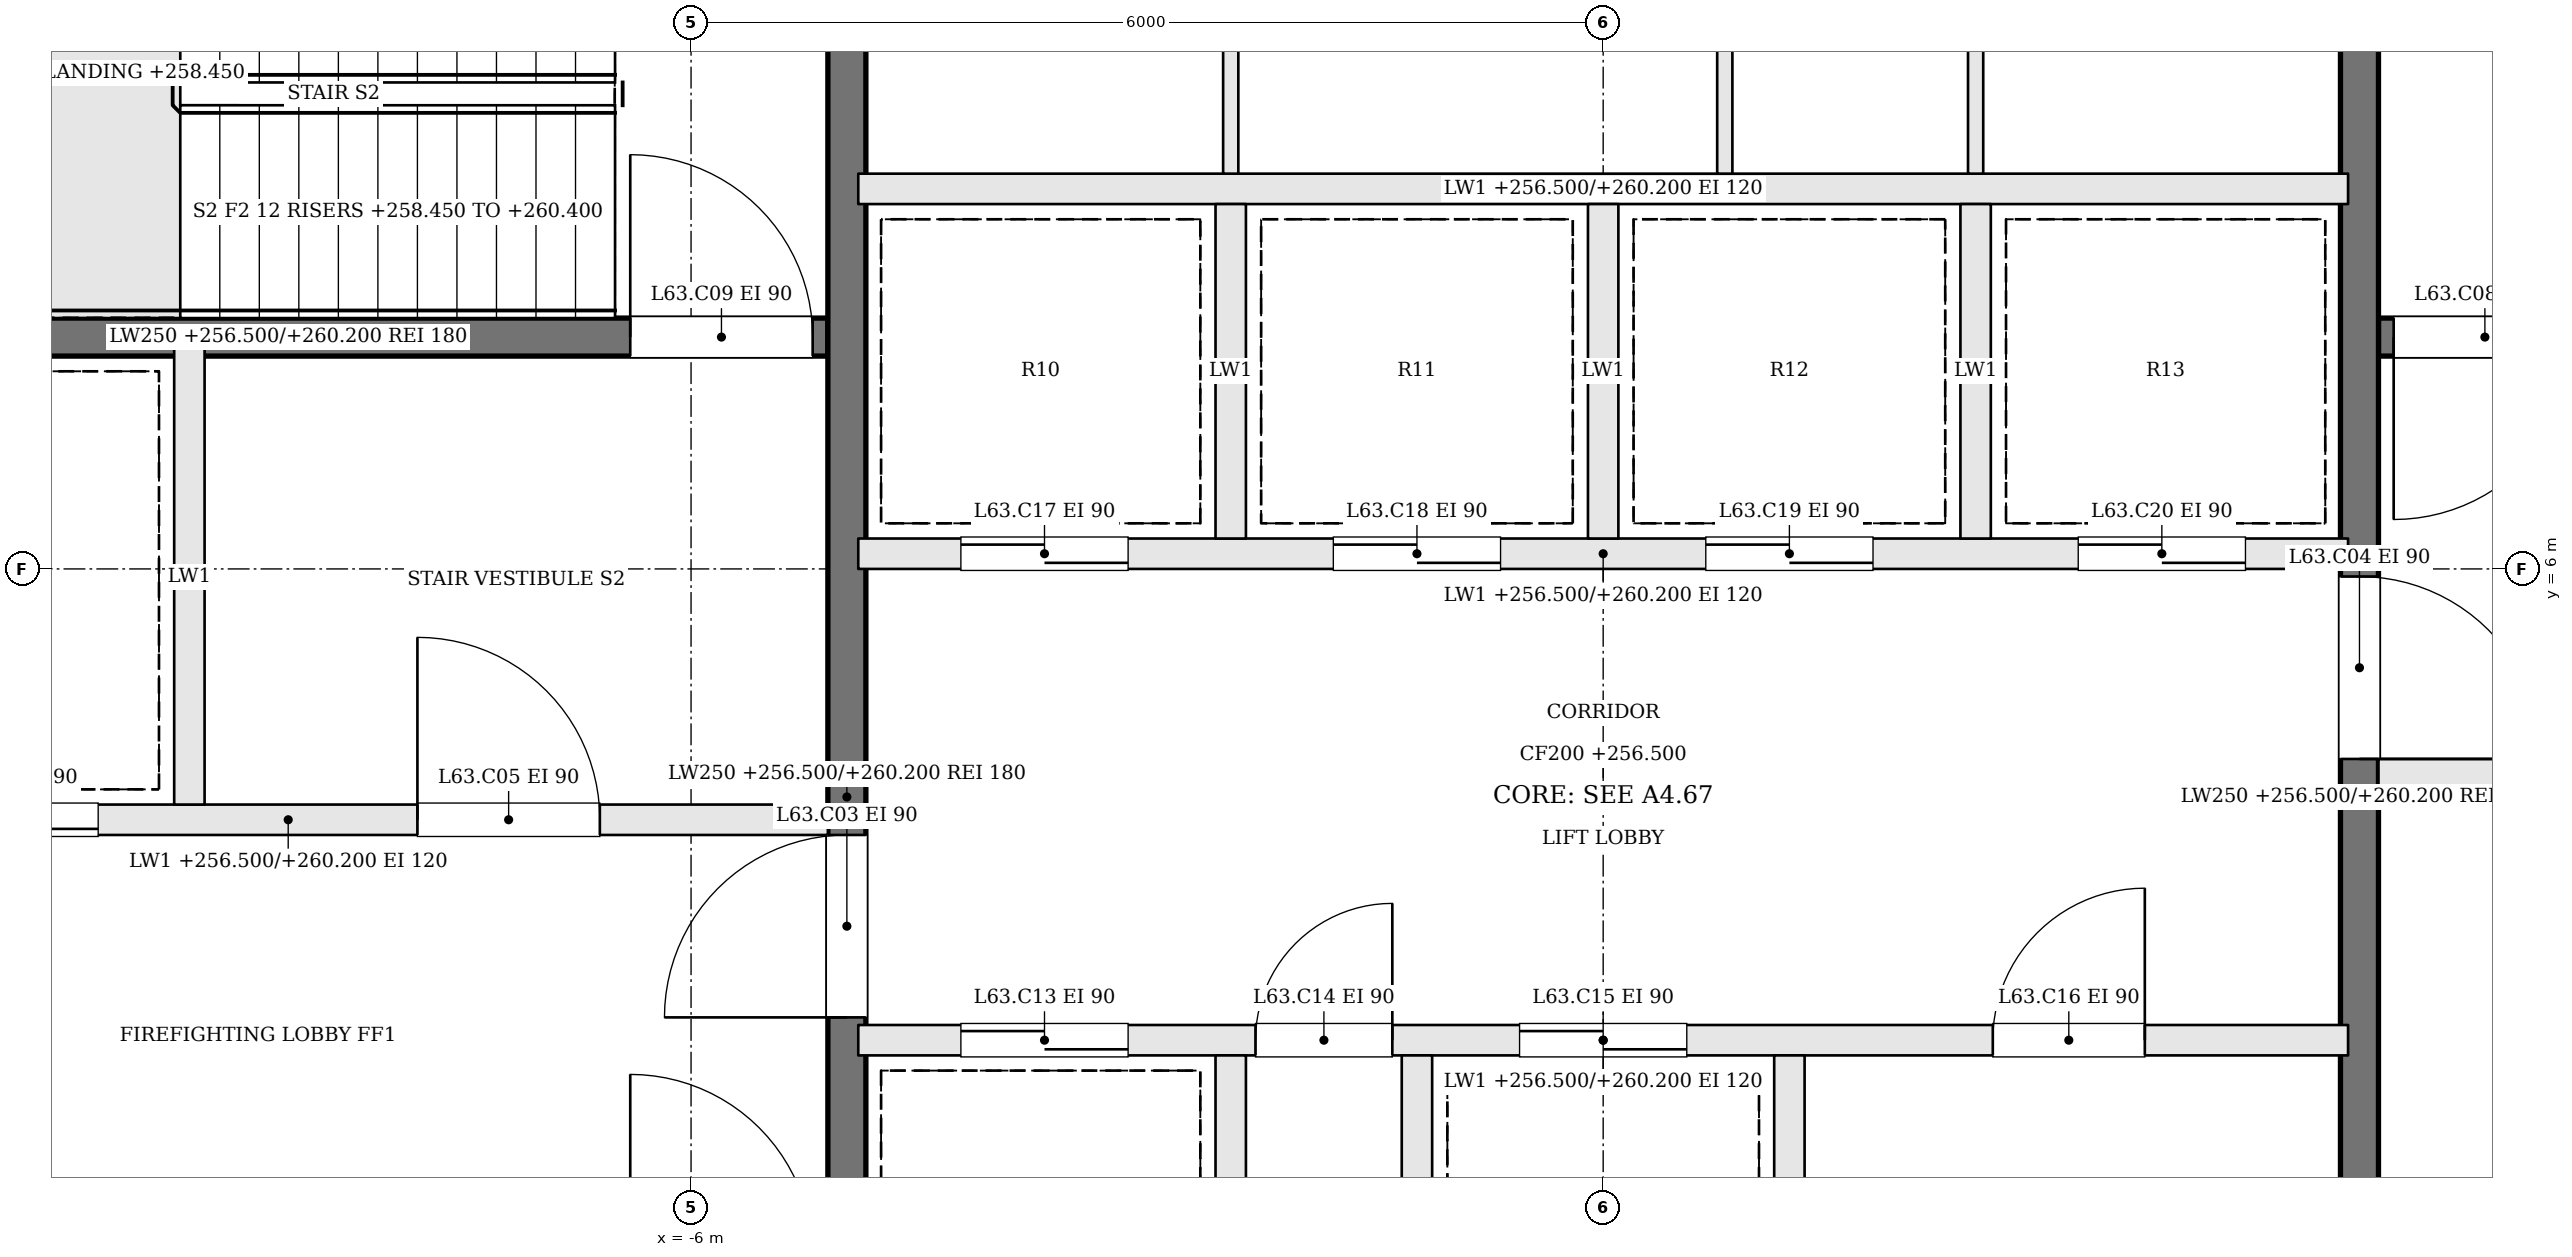
"""IFC4 building model, lengths in metres.
Left out: names, types, materials, properties, quantities, classifications, styles, units other than length and angle.
Written with IfcOpenShell. Run it as: python <this file> out.ifc"""

import sys

from ifc_helpers import new_model, si_unit, direction, frame, frame_2d, origin, place, context, subcontext, project, spatial, rectangle, extrude, element, fill, save


model = new_model("IFC4")
c1 = context("Model", 3, precision=1e-05, world=origin(), true_north=direction((0.0, 1.0)))
c2 = subcontext(c1, "Body", "Model", "MODEL_VIEW")
j1 = project(units=[si_unit("LENGTHUNIT", "METRE"), si_unit("PLANEANGLEUNIT", "RADIAN")], contexts=[c1])
p1 = place(None, origin())
s1 = spatial("IfcSite", under=j1, at=p1, CompositionType="ELEMENT")
p2 = place(p1, origin())
s2 = spatial("IfcBuilding", under=s1, at=p2, CompositionType="ELEMENT")
p3 = place(p2, frame((0.0, 0.0, 256.5)))
s3 = spatial("IfcBuildingStorey", under=s2, at=p3, CompositionType="ELEMENT", Elevation=256.5)
p4 = place(p3, frame((12.2, 7.525, 0.0), z_axis=(0.0, 0.0, 1.0), x_axis=(-1.0, 0.0, 0.0)))
e1 = element("IfcWall", 1, at=p4, inside=s3, PredefinedType="SOLIDWALL", context=c2, shape_type="SweptSolid", body=[
    extrude(rectangle(XDim=7.1, YDim=0.25, at=frame_2d((3.55, 0.0))), origin(), (0.0, 0.0, 1.0), 3.7),
])
p5 = place(p4, frame((5.8, 0.0, 0.0)))
e2 = element("IfcOpeningElement", 2, at=p5, cuts=e1, PredefinedType="OPENING", context=c2, shape_type="SweptSolid", body=[
    extrude(rectangle(XDim=1.2, YDim=2.1, at=frame_2d((0.6, 1.05))), frame((0.0, 0.135, 0.0), z_axis=(0.0, -1.0, 0.0), x_axis=(1.0, 0.0, 0.0)), (0.0, 0.0, 1.0), 0.27),
])
p6 = place(p3, frame((-12.2, 4.35, 0.0), z_axis=(0.0, 0.0, 1.0), x_axis=(1.0, 0.0, 0.0)))
e3 = element("IfcWall", 3, at=p6, inside=s3, PredefinedType="SOLIDWALL", context=c2, shape_type="SweptSolid", body=[
    extrude(rectangle(XDim=7.1, YDim=0.2, at=frame_2d((3.55, 0.0))), origin(), (0.0, 0.0, 1.0), 3.7),
])
p7 = place(p6, frame((4.4, 0.0, 0.0)))
e4 = element("IfcOpeningElement", 4, at=p7, cuts=e3, PredefinedType="OPENING", context=c2, shape_type="SweptSolid", body=[
    extrude(rectangle(XDim=1.2, YDim=2.1, at=frame_2d((0.6, 1.05))), frame((0.0, 0.11, 0.0), z_axis=(0.0, -1.0, 0.0), x_axis=(1.0, 0.0, 0.0)), (0.0, 0.0, 1.0), 0.22),
])
p8 = place(p6, frame((1.1, 0.0, 0.0)))
e5 = element("IfcOpeningElement", 5, at=p8, cuts=e3, PredefinedType="OPENING", context=c2, shape_type="SweptSolid", body=[
    extrude(rectangle(XDim=1.2, YDim=2.1, at=frame_2d((0.6, 1.05))), frame((0.0, 0.11, 0.0), z_axis=(0.0, -1.0, 0.0), x_axis=(1.0, 0.0, 0.0)), (0.0, 0.0, 1.0), 0.22),
])
p9 = place(p3, frame((12.2, 4.65, 0.0), z_axis=(0.0, 0.0, 1.0), x_axis=(-1.0, 0.0, 0.0)))
e6 = element("IfcWall", 6, at=p9, inside=s3, PredefinedType="SOLIDWALL", context=c2, shape_type="SweptSolid", body=[
    extrude(rectangle(XDim=7.1, YDim=0.2, at=frame_2d((3.55, 0.0))), origin(), (0.0, 0.0, 1.0), 3.7),
])
p10 = place(p9, frame((4.4, 0.0, 0.0)))
e7 = element("IfcOpeningElement", 7, at=p10, cuts=e6, PredefinedType="OPENING", context=c2, shape_type="SweptSolid", body=[
    extrude(rectangle(XDim=1.2, YDim=2.1, at=frame_2d((0.6, 1.05))), frame((0.0, 0.11, 0.0), z_axis=(0.0, -1.0, 0.0), x_axis=(1.0, 0.0, 0.0)), (0.0, 0.0, 1.0), 0.22),
])
p11 = place(p9, frame((1.1, 0.0, 0.0)))
e8 = element("IfcOpeningElement", 8, at=p11, cuts=e6, PredefinedType="OPENING", context=c2, shape_type="SweptSolid", body=[
    extrude(rectangle(XDim=1.2, YDim=2.1, at=frame_2d((0.6, 1.05))), frame((0.0, 0.11, 0.0), z_axis=(0.0, -1.0, 0.0), x_axis=(1.0, 0.0, 0.0)), (0.0, 0.0, 1.0), 0.22),
])
p12 = place(p3, frame((-12.2, 7.525, 0.0), z_axis=(0.0, 0.0, 1.0), x_axis=(1.0, 0.0, 0.0)))
e9 = element("IfcWall", 9, at=p12, inside=s3, PredefinedType="SOLIDWALL", context=c2, shape_type="SweptSolid", body=[
    extrude(rectangle(XDim=7.1, YDim=0.25, at=frame_2d((3.55, 0.0))), origin(), (0.0, 0.0, 1.0), 3.7),
])
p13 = place(p12, frame((5.8, 0.0, 0.0)))
e10 = element("IfcOpeningElement", 10, at=p13, cuts=e9, PredefinedType="OPENING", context=c2, shape_type="SweptSolid", body=[
    extrude(rectangle(XDim=1.2, YDim=2.1, at=frame_2d((0.6, 1.05))), frame((0.0, 0.135, 0.0), z_axis=(0.0, -1.0, 0.0), x_axis=(1.0, 0.0, 0.0)), (0.0, 0.0, 1.0), 0.27),
])
p14 = place(p3, frame((-9.3, 4.45, 0.0), z_axis=(0.0, 0.0, 1.0), x_axis=(0.0, 1.0, 0.0)))
e11 = element("IfcWall", 11, at=p14, inside=s3, PredefinedType="SOLIDWALL", context=c2, shape_type="SweptSolid", body=[
    extrude(rectangle(XDim=3.0, YDim=0.2, at=frame_2d((1.5, 0.0))), origin(), (0.0, 0.0, 1.0), 3.7),
])
p15 = place(p3, frame((-4.975, -2.2, 0.0), z_axis=(0.0, 0.0, 1.0), x_axis=(0.0, 1.0, 0.0)))
e12 = element("IfcWall", 12, at=p15, inside=s3, PredefinedType="SOLIDWALL", context=c2, shape_type="SweptSolid", body=[
    extrude(rectangle(XDim=13.4, YDim=0.25, at=frame_2d((6.7, 0.0))), origin(), (0.0, 0.0, 1.0), 3.7),
])
p16 = place(p15, frame((5.25, 0.0, 0.0)))
e13 = element("IfcOpeningElement", 13, at=p16, cuts=e12, PredefinedType="OPENING", context=c2, shape_type="SweptSolid", body=[
    extrude(rectangle(XDim=1.2, YDim=2.1, at=frame_2d((0.6, 1.05))), frame((0.0, 0.135, 0.0), z_axis=(0.0, -1.0, 0.0), x_axis=(1.0, 0.0, 0.0)), (0.0, 0.0, 1.0), 0.27),
])
p17 = place(p3, frame((4.975, 11.2, 0.0), z_axis=(0.0, 0.0, 1.0), x_axis=(0.0, -1.0, 0.0)))
e14 = element("IfcWall", 14, at=p17, inside=s3, PredefinedType="SOLIDWALL", context=c2, shape_type="SweptSolid", body=[
    extrude(rectangle(XDim=13.4, YDim=0.25, at=frame_2d((6.7, 0.0))), origin(), (0.0, 0.0, 1.0), 3.7),
])
p18 = place(p17, frame((5.25, 0.0, 0.0)))
e15 = element("IfcOpeningElement", 15, at=p18, cuts=e14, PredefinedType="OPENING", context=c2, shape_type="SweptSolid", body=[
    extrude(rectangle(XDim=1.2, YDim=2.1, at=frame_2d((0.6, 1.05))), frame((0.0, 0.135, 0.0), z_axis=(0.0, -1.0, 0.0), x_axis=(1.0, 0.0, 0.0)), (0.0, 0.0, 1.0), 0.27),
])
p19 = place(p3, frame((-4.9, 2.9, 0.0), z_axis=(0.0, 0.0, 1.0), x_axis=(1.0, 0.0, 0.0)))
e16 = element("IfcWall", 16, at=p19, inside=s3, PredefinedType="SOLIDWALL", context=c2, shape_type="SweptSolid", body=[
    extrude(rectangle(XDim=9.8, YDim=0.2, at=frame_2d((4.9, 0.0))), origin(), (0.0, 0.0, 1.0), 3.7),
])
p20 = place(p19, frame((0.675, 0.0, 0.0)))
e17 = element("IfcOpeningElement", 17, at=p20, cuts=e16, PredefinedType="OPENING", context=c2, shape_type="SweptSolid", body=[
    extrude(rectangle(XDim=1.1, YDim=2.1, at=frame_2d((0.55, 1.05))), frame((0.0, 0.11, 0.0), z_axis=(0.0, -1.0, 0.0), x_axis=(1.0, 0.0, 0.0)), (0.0, 0.0, 1.0), 0.22),
])
p21 = place(p19, frame((2.613, 0.0, 0.0)))
e18 = element("IfcOpeningElement", 18, at=p21, cuts=e16, PredefinedType="OPENING", context=c2, shape_type="SweptSolid", body=[
    extrude(rectangle(XDim=0.9, YDim=2.1, at=frame_2d((0.45, 1.05))), frame((0.0, 0.11, 0.0), z_axis=(0.0, -1.0, 0.0), x_axis=(1.0, 0.0, 0.0)), (0.0, 0.0, 1.0), 0.22),
])
p22 = place(p19, frame((4.35, 0.0, 0.0)))
e19 = element("IfcOpeningElement", 19, at=p22, cuts=e16, PredefinedType="OPENING", context=c2, shape_type="SweptSolid", body=[
    extrude(rectangle(XDim=1.1, YDim=2.1, at=frame_2d((0.55, 1.05))), frame((0.0, 0.11, 0.0), z_axis=(0.0, -1.0, 0.0), x_axis=(1.0, 0.0, 0.0)), (0.0, 0.0, 1.0), 0.22),
])
p23 = place(p19, frame((7.463, 0.0, 0.0)))
e20 = element("IfcOpeningElement", 20, at=p23, cuts=e16, PredefinedType="OPENING", context=c2, shape_type="SweptSolid", body=[
    extrude(rectangle(XDim=1.0, YDim=2.1, at=frame_2d((0.5, 1.05))), frame((0.0, 0.11, 0.0), z_axis=(0.0, -1.0, 0.0), x_axis=(1.0, 0.0, 0.0)), (0.0, 0.0, 1.0), 0.22),
])
p24 = place(p3, frame((-4.9, 6.1, 0.0), z_axis=(0.0, 0.0, 1.0), x_axis=(1.0, 0.0, 0.0)))
e21 = element("IfcWall", 21, at=p24, inside=s3, PredefinedType="SOLIDWALL", context=c2, shape_type="SweptSolid", body=[
    extrude(rectangle(XDim=9.8, YDim=0.2, at=frame_2d((4.9, 0.0))), origin(), (0.0, 0.0, 1.0), 3.7),
])
p25 = place(p24, frame((0.675, 0.0, 0.0)))
e22 = element("IfcOpeningElement", 22, at=p25, cuts=e21, PredefinedType="OPENING", context=c2, shape_type="SweptSolid", body=[
    extrude(rectangle(XDim=1.1, YDim=2.1, at=frame_2d((0.55, 1.05))), frame((0.0, 0.11, 0.0), z_axis=(0.0, -1.0, 0.0), x_axis=(1.0, 0.0, 0.0)), (0.0, 0.0, 1.0), 0.22),
])
p26 = place(p24, frame((3.125, 0.0, 0.0)))
e23 = element("IfcOpeningElement", 23, at=p26, cuts=e21, PredefinedType="OPENING", context=c2, shape_type="SweptSolid", body=[
    extrude(rectangle(XDim=1.1, YDim=2.1, at=frame_2d((0.55, 1.05))), frame((0.0, 0.11, 0.0), z_axis=(0.0, -1.0, 0.0), x_axis=(1.0, 0.0, 0.0)), (0.0, 0.0, 1.0), 0.22),
])
p27 = place(p24, frame((5.575, 0.0, 0.0)))
e24 = element("IfcOpeningElement", 24, at=p27, cuts=e21, PredefinedType="OPENING", context=c2, shape_type="SweptSolid", body=[
    extrude(rectangle(XDim=1.1, YDim=2.1, at=frame_2d((0.55, 1.05))), frame((0.0, 0.11, 0.0), z_axis=(0.0, -1.0, 0.0), x_axis=(1.0, 0.0, 0.0)), (0.0, 0.0, 1.0), 0.22),
])
p28 = place(p24, frame((8.025, 0.0, 0.0)))
e25 = element("IfcOpeningElement", 25, at=p28, cuts=e21, PredefinedType="OPENING", context=c2, shape_type="SweptSolid", body=[
    extrude(rectangle(XDim=1.1, YDim=2.1, at=frame_2d((0.55, 1.05))), frame((0.0, 0.11, 0.0), z_axis=(0.0, -1.0, 0.0), x_axis=(1.0, 0.0, 0.0)), (0.0, 0.0, 1.0), 0.22),
])
p29 = place(p3, frame((-4.9, 8.5, 0.0), z_axis=(0.0, 0.0, 1.0), x_axis=(1.0, 0.0, 0.0)))
e26 = element("IfcWall", 26, at=p29, inside=s3, PredefinedType="SOLIDWALL", context=c2, shape_type="SweptSolid", body=[
    extrude(rectangle(XDim=9.8, YDim=0.2, at=frame_2d((4.9, 0.0))), origin(), (0.0, 0.0, 1.0), 3.7),
])
for number, where, z_axis, x_axis in (
    (27, (-2.45, 0.6, 0.0), (0.0, 0.0, 1.0), (0.0, 1.0, 0.0)),
    (28, (-1.225, 0.6, 0.0), (0.0, 0.0, 1.0), (0.0, 1.0, 0.0)),
    (29, (1.225, 0.6, 0.0), (0.0, 0.0, 1.0), (0.0, 1.0, 0.0)),
    (30, (-2.45, 6.2, 0.0), (0.0, 0.0, 1.0), (0.0, 1.0, 0.0)),
    (31, (0.0, 6.2, 0.0), (0.0, 0.0, 1.0), (0.0, 1.0, 0.0)),
    (32, (2.45, 6.2, 0.0), (0.0, 0.0, 1.0), (0.0, 1.0, 0.0)),
):
    element("IfcWall", number, at=place(p3, frame(where, z_axis=z_axis, x_axis=x_axis)), inside=s3, PredefinedType="SOLIDWALL", context=c2, shape_type="SweptSolid", body=[
        extrude(rectangle(XDim=2.2, YDim=0.2, at=frame_2d((1.1, 0.0))), origin(), (0.0, 0.0, 1.0), 3.7),
    ])
for number, where, z_axis, x_axis in (
    (33, (-2.45, 8.6, 0.0), (0.0, 0.0, 1.0), (0.0, 1.0, 0.0)),
    (34, (0.8, 8.6, 0.0), (0.0, 0.0, 1.0), (0.0, 1.0, 0.0)),
    (35, (2.45, 8.6, 0.0), (0.0, 0.0, 1.0), (0.0, 1.0, 0.0)),
):
    element("IfcWall", number, at=place(p3, frame(where, z_axis=z_axis, x_axis=x_axis)), inside=s3, PredefinedType="PARTITIONING", context=c2, shape_type="SweptSolid", body=[
        extrude(rectangle(XDim=2.6, YDim=0.1, at=frame_2d((1.3, 0.0))), origin(), (0.0, 0.0, 1.0), 3.7),
    ])
p30 = place(p16, origin())
e36 = element("IfcDoor", 36, at=p30, inside=s3, OperationType="SINGLE_SWING_LEFT", PredefinedType="DOOR", context=c2, shape_type="SweptSolid", body=[
    extrude(rectangle(XDim=1.2, YDim=2.1, at=frame_2d((0.6, 1.05))), frame((0.0, 0.025, 0.0), z_axis=(0.0, -1.0, 0.0), x_axis=(1.0, 0.0, 0.0)), (0.0, 0.0, 1.0), 0.05),
])
fill(e13, e36)
p31 = place(p18, origin())
e37 = element("IfcDoor", 37, at=p31, inside=s3, OperationType="SINGLE_SWING_RIGHT", PredefinedType="DOOR", context=c2, shape_type="SweptSolid", body=[
    extrude(rectangle(XDim=1.2, YDim=2.1, at=frame_2d((0.6, 1.05))), frame((0.0, 0.025, 0.0), z_axis=(0.0, -1.0, 0.0), x_axis=(1.0, 0.0, 0.0)), (0.0, 0.0, 1.0), 0.05),
])
fill(e15, e37)
p32 = place(p7, origin())
e38 = element("IfcDoor", 38, at=p32, inside=s3, OperationType="SINGLE_SWING_LEFT", PredefinedType="DOOR", context=c2, shape_type="SweptSolid", body=[
    extrude(rectangle(XDim=1.2, YDim=2.1, at=frame_2d((0.6, 1.05))), frame((0.0, 0.025, 0.0), z_axis=(0.0, -1.0, 0.0), x_axis=(1.0, 0.0, 0.0)), (0.0, 0.0, 1.0), 0.05),
])
fill(e4, e38)
p33 = place(p5, origin())
e39 = element("IfcDoor", 39, at=p33, inside=s3, OperationType="SINGLE_SWING_RIGHT", PredefinedType="DOOR", context=c2, shape_type="SweptSolid", body=[
    extrude(rectangle(XDim=1.2, YDim=2.1, at=frame_2d((0.6, 1.05))), frame((0.0, 0.025, 0.0), z_axis=(0.0, -1.0, 0.0), x_axis=(1.0, 0.0, 0.0)), (0.0, 0.0, 1.0), 0.05),
])
fill(e2, e39)
p34 = place(p13, origin())
e40 = element("IfcDoor", 40, at=p34, inside=s3, OperationType="SINGLE_SWING_LEFT", PredefinedType="DOOR", context=c2, shape_type="SweptSolid", body=[
    extrude(rectangle(XDim=1.2, YDim=2.1, at=frame_2d((0.6, 1.05))), frame((0.0, 0.025, 0.0), z_axis=(0.0, -1.0, 0.0), x_axis=(1.0, 0.0, 0.0)), (0.0, 0.0, 1.0), 0.05),
])
fill(e10, e40)
p35 = place(p8, origin())
e41 = element("IfcDoor", 41, at=p35, inside=s3, OperationType="SLIDING_TO_RIGHT", PredefinedType="DOOR", context=c2, shape_type="SweptSolid", body=[
    extrude(rectangle(XDim=1.2, YDim=2.1, at=frame_2d((0.6, 1.05))), frame((0.0, 0.025, 0.0), z_axis=(0.0, -1.0, 0.0), x_axis=(1.0, 0.0, 0.0)), (0.0, 0.0, 1.0), 0.05),
])
fill(e5, e41)
p36 = place(p20, origin())
e42 = element("IfcDoor", 42, at=p36, inside=s3, OperationType="SLIDING_TO_RIGHT", PredefinedType="DOOR", context=c2, shape_type="SweptSolid", body=[
    extrude(rectangle(XDim=1.1, YDim=2.1, at=frame_2d((0.55, 1.05))), frame((0.0, 0.025, 0.0), z_axis=(0.0, -1.0, 0.0), x_axis=(1.0, 0.0, 0.0)), (0.0, 0.0, 1.0), 0.05),
])
fill(e17, e42)
p37 = place(p21, origin())
e43 = element("IfcDoor", 43, at=p37, inside=s3, OperationType="SINGLE_SWING_RIGHT", PredefinedType="DOOR", context=c2, shape_type="SweptSolid", body=[
    extrude(rectangle(XDim=0.9, YDim=2.1, at=frame_2d((0.45, 1.05))), frame((0.0, 0.025, 0.0), z_axis=(0.0, -1.0, 0.0), x_axis=(1.0, 0.0, 0.0)), (0.0, 0.0, 1.0), 0.05),
])
fill(e18, e43)
p38 = place(p22, origin())
e44 = element("IfcDoor", 44, at=p38, inside=s3, OperationType="SLIDING_TO_LEFT", PredefinedType="DOOR", context=c2, shape_type="SweptSolid", body=[
    extrude(rectangle(XDim=1.1, YDim=2.1, at=frame_2d((0.55, 1.05))), frame((0.0, 0.025, 0.0), z_axis=(0.0, -1.0, 0.0), x_axis=(1.0, 0.0, 0.0)), (0.0, 0.0, 1.0), 0.05),
])
fill(e19, e44)
p39 = place(p23, origin())
e45 = element("IfcDoor", 45, at=p39, inside=s3, OperationType="SINGLE_SWING_RIGHT", PredefinedType="DOOR", context=c2, shape_type="SweptSolid", body=[
    extrude(rectangle(XDim=1.0, YDim=2.1, at=frame_2d((0.5, 1.05))), frame((0.0, 0.025, 0.0), z_axis=(0.0, -1.0, 0.0), x_axis=(1.0, 0.0, 0.0)), (0.0, 0.0, 1.0), 0.05),
])
fill(e20, e45)
p40 = place(p25, origin())
e46 = element("IfcDoor", 46, at=p40, inside=s3, OperationType="SLIDING_TO_RIGHT", PredefinedType="DOOR", context=c2, shape_type="SweptSolid", body=[
    extrude(rectangle(XDim=1.1, YDim=2.1, at=frame_2d((0.55, 1.05))), frame((0.0, 0.025, 0.0), z_axis=(0.0, -1.0, 0.0), x_axis=(1.0, 0.0, 0.0)), (0.0, 0.0, 1.0), 0.05),
])
fill(e22, e46)
p41 = place(p26, origin())
e47 = element("IfcDoor", 47, at=p41, inside=s3, OperationType="SLIDING_TO_LEFT", PredefinedType="DOOR", context=c2, shape_type="SweptSolid", body=[
    extrude(rectangle(XDim=1.1, YDim=2.1, at=frame_2d((0.55, 1.05))), frame((0.0, 0.025, 0.0), z_axis=(0.0, -1.0, 0.0), x_axis=(1.0, 0.0, 0.0)), (0.0, 0.0, 1.0), 0.05),
])
fill(e23, e47)
p42 = place(p27, origin())
e48 = element("IfcDoor", 48, at=p42, inside=s3, OperationType="SLIDING_TO_RIGHT", PredefinedType="DOOR", context=c2, shape_type="SweptSolid", body=[
    extrude(rectangle(XDim=1.1, YDim=2.1, at=frame_2d((0.55, 1.05))), frame((0.0, 0.025, 0.0), z_axis=(0.0, -1.0, 0.0), x_axis=(1.0, 0.0, 0.0)), (0.0, 0.0, 1.0), 0.05),
])
fill(e24, e48)
p43 = place(p28, origin())
e49 = element("IfcDoor", 49, at=p43, inside=s3, OperationType="SLIDING_TO_LEFT", PredefinedType="DOOR", context=c2, shape_type="SweptSolid", body=[
    extrude(rectangle(XDim=1.1, YDim=2.1, at=frame_2d((0.55, 1.05))), frame((0.0, 0.025, 0.0), z_axis=(0.0, -1.0, 0.0), x_axis=(1.0, 0.0, 0.0)), (0.0, 0.0, 1.0), 0.05),
])
fill(e25, e49)
save(model, sys.argv[1])
